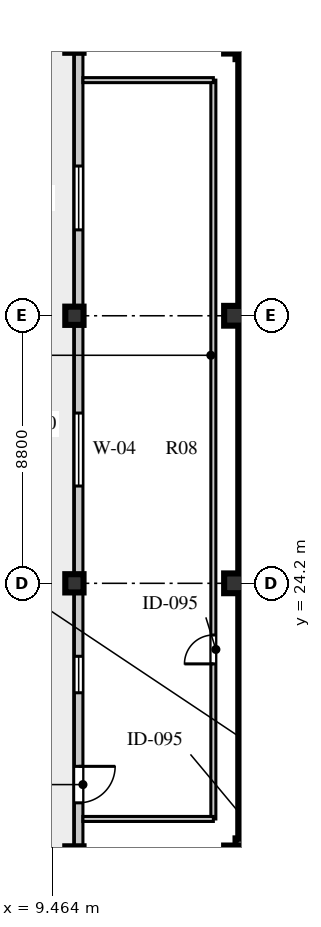
"""IFC4 building model, lengths in metres.
Left out: names, types, materials, properties, quantities, classifications, styles, units other than length and angle.
Written with IfcOpenShell. Run it as: python <this file> out.ifc"""

import sys

from ifc_helpers import new_model, si_unit, direction, frame, frame_2d, origin, origin_2d, place, context, subcontext, project, spatial, rectangle, extrude, element, fill, save


model = new_model("IFC4")
c1 = context("Model", 3, precision=1e-05, world=origin(), true_north=direction((0.0, 1.0)))
c2 = subcontext(c1, "Body", "Model", "MODEL_VIEW")
j1 = project(units=[si_unit("LENGTHUNIT", "METRE"), si_unit("PLANEANGLEUNIT", "RADIAN")], contexts=[c1])
p1 = place(None, origin())
s1 = spatial("IfcSite", under=j1, at=p1, CompositionType="ELEMENT")
p2 = place(p1, origin())
s2 = spatial("IfcBuilding", under=s1, at=p2, CompositionType="ELEMENT")
p3 = place(p2, frame((0.0, 0.0, 327.7)))
s3 = spatial("IfcBuildingStorey", under=s2, at=p3, CompositionType="ELEMENT", Elevation=327.7)
for number, where, z_axis, x_axis in (
    (1, (15.5, 15.61, 0.0), (0.0, 0.0, 1.0), (1.0, 0.0, 0.0)),
    (2, (15.5, 41.64, 0.0), (0.0, 0.0, 1.0), (1.0, 0.0, 0.0)),
):
    element("IfcWall", number, at=place(p3, frame(where, z_axis=z_axis, x_axis=x_axis)), inside=s3, PredefinedType="SHEAR", context=c2, shape_type="SweptSolid", body=[
        extrude(rectangle(XDim=9.48, YDim=0.4, at=frame_2d((4.74, 0.0))), origin(), (0.0, 0.0, 1.0), 3.56),
    ])
p4 = place(p3, frame((15.79, 15.81, 0.0), z_axis=(0.0, 0.0, 1.0), x_axis=(0.0, 1.0, 0.0)))
e3 = element("IfcWall", 3, at=p4, inside=s3, PredefinedType="SHEAR", context=c2, shape_type="SweptSolid", body=[
    extrude(rectangle(XDim=25.63, YDim=0.4, at=frame_2d((12.815, 0.0))), origin(), (0.0, 0.0, 1.0), 3.56),
])
for number, where, z_axis, x_axis in (
    (4, (15.45, 15.25, 0.0), (0.0, 0.0, 1.0), (1.0, 0.0, 0.0)),
    (5, (15.45, 24.2, 0.0), (0.0, 0.0, 1.0), (1.0, 0.0, 0.0)),
    (6, (15.45, 33.0, 0.0), (0.0, 0.0, 1.0), (1.0, 0.0, 0.0)),
    (7, (15.45, 41.95, 0.0), (0.0, 0.0, 1.0), (1.0, 0.0, 0.0)),
):
    element("IfcColumn", number, at=place(p3, frame(where, z_axis=z_axis, x_axis=x_axis)), inside=s3, PredefinedType="COLUMN", context=c2, shape_type="SweptSolid", body=[
        extrude(rectangle(XDim=0.65, YDim=0.65, at=origin_2d()), origin(), (0.0, 0.0, 1.0), 3.56),
    ])
for number, where, z_axis, x_axis in (
    (8, (10.2, 15.25, 0.0), (0.0, 0.0, 1.0), (1.0, 0.0, 0.0)),
    (9, (10.2, 24.2, 0.0), (0.0, 0.0, 1.0), (1.0, 0.0, 0.0)),
    (10, (10.2, 33.0, 0.0), (0.0, 0.0, 1.0), (1.0, 0.0, 0.0)),
    (11, (10.2, 41.95, 0.0), (0.0, 0.0, 1.0), (1.0, 0.0, 0.0)),
):
    element("IfcColumn", number, at=place(p3, frame(where, z_axis=z_axis, x_axis=x_axis)), inside=s3, PredefinedType="COLUMN", context=c2, shape_type="SweptSolid", body=[
        extrude(rectangle(XDim=0.6, YDim=0.6, at=origin_2d()), origin(), (0.0, 0.0, 1.0), 3.56),
    ])
p5 = place(p3, frame((10.34, 42.52, 0.0), z_axis=(0.0, 0.0, 1.0), x_axis=(0.0, -1.0, 0.0)))
e12 = element("IfcWall", 12, at=p5, inside=s3, PredefinedType="STANDARD", context=c2, shape_type="SweptSolid", body=[
    extrude(rectangle(XDim=27.84, YDim=0.28, at=frame_2d((13.92, 0.0))), origin(), (0.0, 0.0, 1.0), 2.92),
])
p6 = place(p5, frame((24.34, 0.0, 0.0)))
e13 = element("IfcOpeningElement", 13, at=p6, cuts=e12, PredefinedType="OPENING", context=c2, shape_type="SweptSolid", body=[
    extrude(rectangle(XDim=1.2, YDim=2.05, at=frame_2d((0.6, 1.025))), frame((0.0, 0.15, 0.0), z_axis=(0.0, -1.0, 0.0), x_axis=(1.0, 0.0, 0.0)), (0.0, 0.0, 1.0), 0.3),
])
p7 = place(p5, frame((20.72, 0.0, 0.8)))
e14 = element("IfcOpeningElement", 14, at=p7, cuts=e12, PredefinedType="OPENING", context=c2, shape_type="SweptSolid", body=[
    extrude(rectangle(XDim=1.2, YDim=1.75, at=frame_2d((0.6, 0.875))), frame((0.0, 0.15, 0.0), z_axis=(0.0, -1.0, 0.0), x_axis=(1.0, 0.0, 0.0)), (0.0, 0.0, 1.0), 0.3),
])
p8 = place(p5, frame((12.72, 0.0, 0.8)))
e15 = element("IfcOpeningElement", 15, at=p8, cuts=e12, PredefinedType="OPENING", context=c2, shape_type="SweptSolid", body=[
    extrude(rectangle(XDim=2.4, YDim=2.05, at=frame_2d((1.2, 1.025))), frame((0.0, 0.15, 0.0), z_axis=(0.0, -1.0, 0.0), x_axis=(1.0, 0.0, 0.0)), (0.0, 0.0, 1.0), 0.3),
])
p9 = place(p5, frame((4.595, 0.0, 0.8)))
e16 = element("IfcOpeningElement", 16, at=p9, cuts=e12, PredefinedType="OPENING", context=c2, shape_type="SweptSolid", body=[
    extrude(rectangle(XDim=2.1, YDim=1.95, at=frame_2d((1.05, 0.975))), frame((0.0, 0.15, 0.0), z_axis=(0.0, -1.0, 0.0), x_axis=(1.0, 0.0, 0.0)), (0.0, 0.0, 1.0), 0.3),
])
p10 = place(p3, frame((14.77, 16.45, 0.0), z_axis=(0.0, 0.0, 1.0), x_axis=(0.0, 1.0, 0.0)))
e17 = element("IfcWall", 17, at=p10, inside=s3, PredefinedType="PARTITIONING", context=c2, shape_type="SweptSolid", body=[
    extrude(rectangle(XDim=24.3, YDim=0.165, at=frame_2d((12.15, 0.0))), origin(), (0.0, 0.0, 1.0), 3.56),
])
p11 = place(p10, frame((5.1, 0.0, 0.0)))
e18 = element("IfcOpeningElement", 18, at=p11, cuts=e17, PredefinedType="OPENING", context=c2, shape_type="SweptSolid", body=[
    extrude(rectangle(XDim=0.95, YDim=2.08, at=frame_2d((0.475, 1.04))), frame((0.0, 0.093, 0.0), z_axis=(0.0, -1.0, 0.0), x_axis=(1.0, 0.0, 0.0)), (0.0, 0.0, 1.0), 0.185),
])
for number, where, z_axis, x_axis in (
    (19, (10.48, 16.45, 0.0), (0.0, 0.0, 1.0), (1.0, 0.0, 0.0)),
    (20, (10.48, 40.75, 0.0), (0.0, 0.0, 1.0), (1.0, 0.0, 0.0)),
):
    element("IfcWall", number, at=place(p3, frame(where, z_axis=z_axis, x_axis=x_axis)), inside=s3, PredefinedType="PARTITIONING", context=c2, shape_type="SweptSolid", body=[
        extrude(rectangle(XDim=4.29, YDim=0.165, at=frame_2d((2.145, 0.0))), origin(), (0.0, 0.0, 1.0), 3.56),
    ])
p12 = place(p6, frame((1.2, 0.0, 0.0), z_axis=(0.0, 0.0, 1.0), x_axis=(-1.0, 0.0, 0.0)))
e21 = element("IfcDoor", 21, at=p12, inside=s3, OperationType="SINGLE_SWING_RIGHT", PredefinedType="DOOR", context=c2, shape_type="SweptSolid", body=[
    extrude(rectangle(XDim=1.2, YDim=2.05, at=frame_2d((0.6, 1.025))), frame((0.0, 0.025, 0.0), z_axis=(0.0, -1.0, 0.0), x_axis=(1.0, 0.0, 0.0)), (0.0, 0.0, 1.0), 0.05),
])
fill(e13, e21)
p13 = place(p7, origin())
e22 = element("IfcWindow", 22, at=p13, inside=s3, PartitioningType="SINGLE_PANEL", PredefinedType="WINDOW", context=c2, shape_type="SweptSolid", body=[
    extrude(rectangle(XDim=1.2, YDim=1.75, at=frame_2d((0.6, 0.875))), frame((0.0, 0.03, 0.0), z_axis=(0.0, -1.0, 0.0), x_axis=(1.0, 0.0, 0.0)), (0.0, 0.0, 1.0), 0.06),
])
fill(e14, e22)
p14 = place(p8, origin())
e23 = element("IfcWindow", 23, at=p14, inside=s3, PartitioningType="SINGLE_PANEL", PredefinedType="WINDOW", context=c2, shape_type="SweptSolid", body=[
    extrude(rectangle(XDim=2.4, YDim=2.05, at=frame_2d((1.2, 1.025))), frame((0.0, 0.03, 0.0), z_axis=(0.0, -1.0, 0.0), x_axis=(1.0, 0.0, 0.0)), (0.0, 0.0, 1.0), 0.06),
])
fill(e15, e23)
p15 = place(p9, origin())
e24 = element("IfcWindow", 24, at=p15, inside=s3, PartitioningType="SINGLE_PANEL", PredefinedType="WINDOW", context=c2, shape_type="SweptSolid", body=[
    extrude(rectangle(XDim=2.1, YDim=1.95, at=frame_2d((1.05, 0.975))), frame((0.0, 0.03, 0.0), z_axis=(0.0, -1.0, 0.0), x_axis=(1.0, 0.0, 0.0)), (0.0, 0.0, 1.0), 0.06),
])
fill(e16, e24)
p16 = place(p11, origin())
e25 = element("IfcDoor", 25, at=p16, inside=s3, OperationType="SINGLE_SWING_LEFT", PredefinedType="DOOR", context=c2, shape_type="SweptSolid", body=[
    extrude(rectangle(XDim=0.95, YDim=2.08, at=frame_2d((0.475, 1.04))), frame((0.0, 0.025, 0.0), z_axis=(0.0, -1.0, 0.0), x_axis=(1.0, 0.0, 0.0)), (0.0, 0.0, 1.0), 0.05),
])
fill(e18, e25)
save(model, sys.argv[1])
